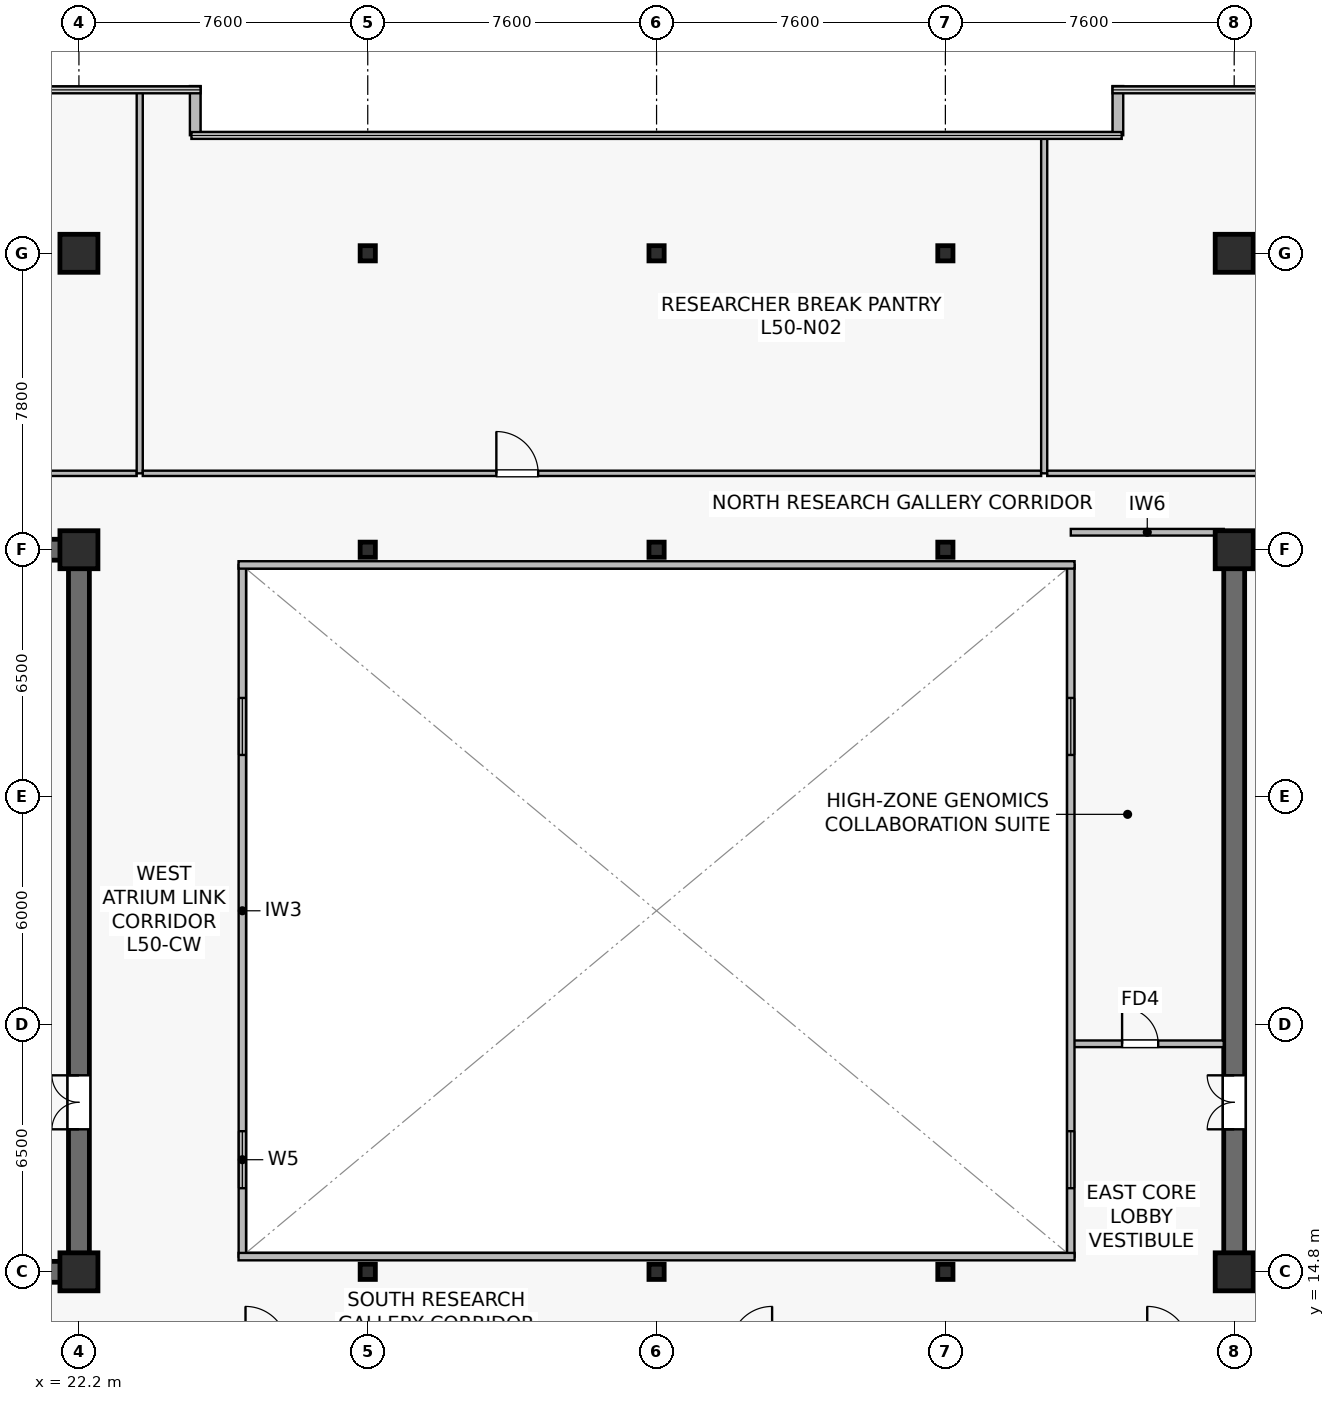
"""IFC4 building model, lengths in metres.
Left out: names, types, materials, properties, quantities, classifications, styles, units other than length and angle.
Written with IfcOpenShell. Run it as: python <this file> out.ifc"""

import sys

from ifc_helpers import new_model, si_unit, direction, frame, frame_2d, origin, origin_2d, place, context, subcontext, project, spatial, rectangle, hollow_rectangle, extrude, source, transform, mapped, element, fill, save


model = new_model("IFC4")
c1 = context("Model", 3, precision=1e-05, world=origin(), true_north=direction((0.0, 1.0)))
c2 = subcontext(c1, "Body", "Model", "MODEL_VIEW")
j1 = project(units=[si_unit("LENGTHUNIT", "METRE"), si_unit("PLANEANGLEUNIT", "RADIAN")], contexts=[c1])
p1 = place(None, origin())
s1 = spatial("IfcSite", under=j1, at=p1, CompositionType="ELEMENT")
p2 = place(p1, origin())
s2 = spatial("IfcBuilding", under=s1, at=p2, CompositionType="ELEMENT")
p3 = place(p2, frame((0.0, 0.0, 209.6)))
s3 = spatial("IfcBuildingStorey", under=s2, at=p3, CompositionType="ELEMENT", Elevation=209.6)
p4 = place(p3, frame((7.125, 14.8, 0.0), z_axis=(0.0, 0.0, 1.0), x_axis=(1.0, 0.0, 0.0)))
e1 = element("IfcWall", 1, at=p4, inside=s3, PredefinedType="SHEAR", context=c2, shape_type="SweptSolid", body=[
    extrude(rectangle(XDim=15.35, YDim=0.55, at=frame_2d((7.675, 0.0))), origin(), (0.0, 0.0, 1.0), 3.8),
])
p5 = place(p3, frame((7.125, 33.8, 0.0), z_axis=(0.0, 0.0, 1.0), x_axis=(1.0, 0.0, 0.0)))
e2 = element("IfcWall", 2, at=p5, inside=s3, PredefinedType="SHEAR", context=c2, shape_type="SweptSolid", body=[
    extrude(rectangle(XDim=15.35, YDim=0.55, at=frame_2d((7.675, 0.0))), origin(), (0.0, 0.0, 1.0), 3.8),
])
p6 = place(p5, frame((5.2, 0.0, 0.0)))
e3 = element("IfcOpeningElement", 3, at=p6, cuts=e2, PredefinedType="OPENING", context=c2, shape_type="SweptSolid", body=[
    extrude(rectangle(XDim=0.95, YDim=2.15, at=frame_2d((0.475, 1.075))), frame((0.0, 0.285, 0.0), z_axis=(0.0, -1.0, 0.0), x_axis=(1.0, 0.0, 0.0)), (0.0, 0.0, 1.0), 0.57),
])
p7 = place(p5, frame((7.715, 0.0, 0.0)))
e4 = element("IfcOpeningElement", 4, at=p7, cuts=e2, PredefinedType="OPENING", context=c2, shape_type="SweptSolid", body=[
    extrude(rectangle(XDim=0.95, YDim=2.15, at=frame_2d((0.475, 1.075))), frame((0.0, 0.285, 0.0), z_axis=(0.0, -1.0, 0.0), x_axis=(1.0, 0.0, 0.0)), (0.0, 0.0, 1.0), 0.57),
])
p8 = place(p5, frame((10.265, 0.0, 0.0)))
e5 = element("IfcOpeningElement", 5, at=p8, cuts=e2, PredefinedType="OPENING", context=c2, shape_type="SweptSolid", body=[
    extrude(rectangle(XDim=0.95, YDim=2.15, at=frame_2d((0.475, 1.075))), frame((0.0, 0.285, 0.0), z_axis=(0.0, -1.0, 0.0), x_axis=(1.0, 0.0, 0.0)), (0.0, 0.0, 1.0), 0.57),
])
p9 = place(p5, frame((12.815, 0.0, 0.0)))
e6 = element("IfcOpeningElement", 6, at=p9, cuts=e2, PredefinedType="OPENING", context=c2, shape_type="SweptSolid", body=[
    extrude(rectangle(XDim=0.95, YDim=2.15, at=frame_2d((0.475, 1.075))), frame((0.0, 0.285, 0.0), z_axis=(0.0, -1.0, 0.0), x_axis=(1.0, 0.0, 0.0)), (0.0, 0.0, 1.0), 0.57),
])
p10 = place(p3, frame((22.2, 15.075, 0.0), z_axis=(0.0, 0.0, 1.0), x_axis=(0.0, 1.0, 0.0)))
e7 = element("IfcWall", 7, at=p10, inside=s3, PredefinedType="SHEAR", context=c2, shape_type="SweptSolid", body=[
    extrude(rectangle(XDim=18.45, YDim=0.55, at=frame_2d((9.225, 0.0))), origin(), (0.0, 0.0, 1.0), 3.8),
])
p11 = place(p10, frame((3.475, 0.0, 0.0)))
e8 = element("IfcOpeningElement", 8, at=p11, cuts=e7, PredefinedType="OPENING", context=c2, shape_type="SweptSolid", body=[
    extrude(rectangle(XDim=1.42, YDim=2.2, at=frame_2d((0.71, 1.1))), frame((0.0, 0.285, 0.0), z_axis=(0.0, -1.0, 0.0), x_axis=(1.0, 0.0, 0.0)), (0.0, 0.0, 1.0), 0.57),
])
p12 = place(p3, frame((52.325, 14.8, 0.0), z_axis=(0.0, 0.0, 1.0), x_axis=(1.0, 0.0, 0.0)))
e9 = element("IfcWall", 9, at=p12, inside=s3, PredefinedType="SHEAR", context=c2, shape_type="SweptSolid", body=[
    extrude(rectangle(XDim=15.35, YDim=0.55, at=frame_2d((7.675, 0.0))), origin(), (0.0, 0.0, 1.0), 3.8),
])
p13 = place(p3, frame((52.325, 33.8, 0.0), z_axis=(0.0, 0.0, 1.0), x_axis=(1.0, 0.0, 0.0)))
e10 = element("IfcWall", 10, at=p13, inside=s3, PredefinedType="SHEAR", context=c2, shape_type="SweptSolid", body=[
    extrude(rectangle(XDim=15.35, YDim=0.55, at=frame_2d((7.675, 0.0))), origin(), (0.0, 0.0, 1.0), 3.8),
])
p14 = place(p13, frame((9.2, 0.0, 0.0)))
e11 = element("IfcOpeningElement", 11, at=p14, cuts=e10, PredefinedType="OPENING", context=c2, shape_type="SweptSolid", body=[
    extrude(rectangle(XDim=0.95, YDim=2.15, at=frame_2d((0.475, 1.075))), frame((0.0, 0.285, 0.0), z_axis=(0.0, -1.0, 0.0), x_axis=(1.0, 0.0, 0.0)), (0.0, 0.0, 1.0), 0.57),
])
p15 = place(p13, frame((6.685, 0.0, 0.0)))
e12 = element("IfcOpeningElement", 12, at=p15, cuts=e10, PredefinedType="OPENING", context=c2, shape_type="SweptSolid", body=[
    extrude(rectangle(XDim=0.95, YDim=2.15, at=frame_2d((0.475, 1.075))), frame((0.0, 0.285, 0.0), z_axis=(0.0, -1.0, 0.0), x_axis=(1.0, 0.0, 0.0)), (0.0, 0.0, 1.0), 0.57),
])
p16 = place(p13, frame((4.135, 0.0, 0.0)))
e13 = element("IfcOpeningElement", 13, at=p16, cuts=e10, PredefinedType="OPENING", context=c2, shape_type="SweptSolid", body=[
    extrude(rectangle(XDim=0.95, YDim=2.15, at=frame_2d((0.475, 1.075))), frame((0.0, 0.285, 0.0), z_axis=(0.0, -1.0, 0.0), x_axis=(1.0, 0.0, 0.0)), (0.0, 0.0, 1.0), 0.57),
])
p17 = place(p13, frame((1.585, 0.0, 0.0)))
e14 = element("IfcOpeningElement", 14, at=p17, cuts=e10, PredefinedType="OPENING", context=c2, shape_type="SweptSolid", body=[
    extrude(rectangle(XDim=0.95, YDim=2.15, at=frame_2d((0.475, 1.075))), frame((0.0, 0.285, 0.0), z_axis=(0.0, -1.0, 0.0), x_axis=(1.0, 0.0, 0.0)), (0.0, 0.0, 1.0), 0.57),
])
p18 = place(p3, frame((52.6, 15.075, 0.0), z_axis=(0.0, 0.0, 1.0), x_axis=(0.0, 1.0, 0.0)))
e15 = element("IfcWall", 15, at=p18, inside=s3, PredefinedType="SHEAR", context=c2, shape_type="SweptSolid", body=[
    extrude(rectangle(XDim=18.45, YDim=0.55, at=frame_2d((9.225, 0.0))), origin(), (0.0, 0.0, 1.0), 3.8),
])
p19 = place(p18, frame((3.475, 0.0, 0.0)))
e16 = element("IfcOpeningElement", 16, at=p19, cuts=e15, PredefinedType="OPENING", context=c2, shape_type="SweptSolid", body=[
    extrude(rectangle(XDim=1.42, YDim=2.2, at=frame_2d((0.71, 1.1))), frame((0.0, 0.285, 0.0), z_axis=(0.0, -1.0, 0.0), x_axis=(1.0, 0.0, 0.0)), (0.0, 0.0, 1.0), 0.57),
])
m1 = source(origin(), c2, "Body", "SweptSolid", [
    extrude(rectangle(XDim=1.0, YDim=1.0, at=origin_2d()), origin(), (0.0, 0.0, 1.0), 4.1),
])
for number, where, z_axis, x_axis in (
    (17, (22.2, 14.8, 0.0), (0.0, 0.0, 1.0), (1.0, 0.0, 0.0)),
    (18, (22.2, 33.8, 0.0), (0.0, 0.0, 1.0), (1.0, 0.0, 0.0)),
    (19, (22.2, 41.6, 0.0), (0.0, 0.0, 1.0), (1.0, 0.0, 0.0)),
    (20, (52.6, 14.8, 0.0), (0.0, 0.0, 1.0), (1.0, 0.0, 0.0)),
    (21, (52.6, 33.8, 0.0), (0.0, 0.0, 1.0), (1.0, 0.0, 0.0)),
    (22, (52.6, 41.6, 0.0), (0.0, 0.0, 1.0), (1.0, 0.0, 0.0)),
):
    element("IfcColumn", number, at=place(p3, frame(where, z_axis=z_axis, x_axis=x_axis)), inside=s3, PredefinedType="COLUMN", context=c2, shape_type="MappedRepresentation", body=[
        mapped(m1, transform((0.0, 0.0, 0.0), scale=1.0)),
    ])
m2 = source(origin(), c2, "Body", "SweptSolid", [
    extrude(hollow_rectangle(XDim=0.4, YDim=0.4, WallThickness=0.019, at=origin_2d()), origin(), (0.0, 0.0, 1.0), 4.1),
])
for number, where, z_axis, x_axis in (
    (23, (29.8, 14.8, 0.0), (0.0, 0.0, 1.0), (1.0, 0.0, 0.0)),
    (24, (29.8, 33.8, 0.0), (0.0, 0.0, 1.0), (1.0, 0.0, 0.0)),
    (25, (29.8, 41.6, 0.0), (0.0, 0.0, 1.0), (1.0, 0.0, 0.0)),
    (26, (37.4, 14.8, 0.0), (0.0, 0.0, 1.0), (1.0, 0.0, 0.0)),
    (27, (37.4, 33.8, 0.0), (0.0, 0.0, 1.0), (1.0, 0.0, 0.0)),
    (28, (37.4, 41.6, 0.0), (0.0, 0.0, 1.0), (1.0, 0.0, 0.0)),
    (29, (45.0, 14.8, 0.0), (0.0, 0.0, 1.0), (1.0, 0.0, 0.0)),
    (30, (45.0, 33.8, 0.0), (0.0, 0.0, 1.0), (1.0, 0.0, 0.0)),
    (31, (45.0, 41.6, 0.0), (0.0, 0.0, 1.0), (1.0, 0.0, 0.0)),
):
    element("IfcColumn", number, at=place(p3, frame(where, z_axis=z_axis, x_axis=x_axis)), inside=s3, PredefinedType="COLUMN", context=c2, shape_type="MappedRepresentation", body=[
        mapped(m2, transform((0.0, 0.0, 0.0), scale=1.0)),
    ])
for number, where, z_axis, x_axis in (
    (32, (49.54, 46.0, 0.0), (0.0, 0.0, 1.0), (0.0, -1.0, 0.0)),
    (33, (25.26, 44.707, 0.0), (0.0, 0.0, 1.0), (0.0, 1.0, 0.0)),
):
    element("IfcWall", number, at=place(p3, frame(where, z_axis=z_axis, x_axis=x_axis)), inside=s3, PredefinedType="STANDARD", context=c2, shape_type="SweptSolid", body=[
        extrude(rectangle(XDim=1.293, YDim=0.28, at=frame_2d((0.646, 0.0))), origin(), (0.0, 0.0, 1.0), 3.8),
    ])
p20 = place(p3, frame((48.3, 34.26, 0.0), z_axis=(0.0, 0.0, 1.0), x_axis=(1.0, 0.0, 0.0)))
e34 = element("IfcWall", 34, at=p20, inside=s3, PredefinedType="PARTITIONING", context=c2, shape_type="SweptSolid", body=[
    extrude(rectangle(XDim=4.025, YDim=0.175, at=frame_2d((2.012, 0.0))), origin(), (0.0, 0.0, 1.0), 3.485),
])
p21 = place(p3, frame((48.3, 20.8, 0.0), z_axis=(0.0, 0.0, 1.0), x_axis=(1.0, 0.0, 0.0)))
e35 = element("IfcWall", 35, at=p21, inside=s3, PredefinedType="PARTITIONING", context=c2, shape_type="SweptSolid", body=[
    extrude(rectangle(XDim=4.025, YDim=0.175, at=frame_2d((2.012, 0.0))), origin(), (0.0, 0.0, 1.0), 3.8),
])
p22 = place(p21, frame((1.35, 0.0, 0.0)))
e36 = element("IfcOpeningElement", 36, at=p22, cuts=e35, PredefinedType="OPENING", context=c2, shape_type="SweptSolid", body=[
    extrude(rectangle(XDim=0.95, YDim=2.15, at=frame_2d((0.475, 1.075))), frame((0.0, 0.098, 0.0), z_axis=(0.0, -1.0, 0.0), x_axis=(1.0, 0.0, 0.0)), (0.0, 0.0, 1.0), 0.195),
])
p23 = place(p3, frame((26.5, 15.2, 0.0), z_axis=(0.0, 0.0, 1.0), x_axis=(0.0, 1.0, 0.0)))
e37 = element("IfcWall", 37, at=p23, inside=s3, PredefinedType="SOLIDWALL", context=c2, shape_type="SweptSolid", body=[
    extrude(rectangle(XDim=18.2, YDim=0.195, at=frame_2d((9.1, 0.0))), origin(), (0.0, 0.0, 1.0), 3.8),
])
p24 = place(p23, frame((1.8, 0.0, 0.9)))
e38 = element("IfcOpeningElement", 38, at=p24, cuts=e37, PredefinedType="OPENING", context=c2, shape_type="SweptSolid", body=[
    extrude(rectangle(XDim=1.5, YDim=1.4, at=frame_2d((0.75, 0.7))), frame((0.0, 0.107, 0.0), z_axis=(0.0, -1.0, 0.0), x_axis=(1.0, 0.0, 0.0)), (0.0, 0.0, 1.0), 0.215),
])
p25 = place(p23, frame((13.2, 0.0, 0.9)))
e39 = element("IfcOpeningElement", 39, at=p25, cuts=e37, PredefinedType="OPENING", context=c2, shape_type="SweptSolid", body=[
    extrude(rectangle(XDim=1.5, YDim=1.4, at=frame_2d((0.75, 0.7))), frame((0.0, 0.107, 0.0), z_axis=(0.0, -1.0, 0.0), x_axis=(1.0, 0.0, 0.0)), (0.0, 0.0, 1.0), 0.215),
])
p26 = place(p3, frame((48.3, 15.2, 0.0), z_axis=(0.0, 0.0, 1.0), x_axis=(0.0, 1.0, 0.0)))
e40 = element("IfcWall", 40, at=p26, inside=s3, PredefinedType="SOLIDWALL", context=c2, shape_type="SweptSolid", body=[
    extrude(rectangle(XDim=18.2, YDim=0.195, at=frame_2d((9.1, 0.0))), origin(), (0.0, 0.0, 1.0), 3.8),
])
p27 = place(p26, frame((1.8, 0.0, 0.9)))
e41 = element("IfcOpeningElement", 41, at=p27, cuts=e40, PredefinedType="OPENING", context=c2, shape_type="SweptSolid", body=[
    extrude(rectangle(XDim=1.5, YDim=1.4, at=frame_2d((0.75, 0.7))), frame((0.0, 0.107, 0.0), z_axis=(0.0, -1.0, 0.0), x_axis=(1.0, 0.0, 0.0)), (0.0, 0.0, 1.0), 0.215),
])
p28 = place(p26, frame((13.2, 0.0, 0.9)))
e42 = element("IfcOpeningElement", 42, at=p28, cuts=e40, PredefinedType="OPENING", context=c2, shape_type="SweptSolid", body=[
    extrude(rectangle(XDim=1.5, YDim=1.4, at=frame_2d((0.75, 0.7))), frame((0.0, 0.107, 0.0), z_axis=(0.0, -1.0, 0.0), x_axis=(1.0, 0.0, 0.0)), (0.0, 0.0, 1.0), 0.215),
])
for number, where, z_axis, x_axis in (
    (43, (26.4, 15.2, 0.0), (0.0, 0.0, 1.0), (1.0, 0.0, 0.0)),
    (44, (26.4, 33.4, 0.0), (0.0, 0.0, 1.0), (1.0, 0.0, 0.0)),
):
    element("IfcWall", number, at=place(p3, frame(where, z_axis=z_axis, x_axis=x_axis)), inside=s3, PredefinedType="SOLIDWALL", context=c2, shape_type="SweptSolid", body=[
        extrude(rectangle(XDim=22.0, YDim=0.195, at=frame_2d((11.0, 0.0))), origin(), (0.0, 0.0, 1.0), 3.8),
    ])
p29 = place(p3, frame((7.31, 35.81, 0.0), z_axis=(0.0, 0.0, 1.0), x_axis=(1.0, 0.0, 0.0)))
e45 = element("IfcWall", 45, at=p29, inside=s3, PredefinedType="PARTITIONING", context=c2, shape_type="SweptSolid", body=[
    extrude(rectangle(XDim=16.41, YDim=0.14, at=frame_2d((8.205, 0.0))), origin(), (0.0, 0.0, 1.0), 3.197),
])
p30 = place(p29, frame((8.093, 0.0, 0.0)))
e46 = element("IfcOpeningElement", 46, at=p30, cuts=e45, PredefinedType="OPENING", context=c2, shape_type="SweptSolid", body=[
    extrude(rectangle(XDim=1.1, YDim=2.18, at=frame_2d((0.55, 1.09))), frame((0.0, 0.08, 0.0), z_axis=(0.0, -1.0, 0.0), x_axis=(1.0, 0.0, 0.0)), (0.0, 0.0, 1.0), 0.16),
])
p31 = place(p3, frame((23.8, 35.81, 0.0), z_axis=(0.0, 0.0, 1.0), x_axis=(0.0, 1.0, 0.0)))
e47 = element("IfcWall", 47, at=p31, inside=s3, PredefinedType="PARTITIONING", context=c2, shape_type="SweptSolid", body=[
    extrude(rectangle(XDim=10.08, YDim=0.16, at=frame_2d((5.04, 0.0))), origin(), (0.0, 0.0, 1.0), 3.135),
])
p32 = place(p3, frame((23.88, 35.81, 0.0), z_axis=(0.0, 0.0, 1.0), x_axis=(1.0, 0.0, 0.0)))
e48 = element("IfcWall", 48, at=p32, inside=s3, PredefinedType="PARTITIONING", context=c2, shape_type="SweptSolid", body=[
    extrude(rectangle(XDim=23.64, YDim=0.14, at=frame_2d((11.82, 0.0))), origin(), (0.0, 0.0, 1.0), 3.197),
])
p33 = place(p32, frame((9.304, 0.0, 0.0)))
e49 = element("IfcOpeningElement", 49, at=p33, cuts=e48, PredefinedType="OPENING", context=c2, shape_type="SweptSolid", body=[
    extrude(rectangle(XDim=1.1, YDim=2.18, at=frame_2d((0.55, 1.09))), frame((0.0, 0.08, 0.0), z_axis=(0.0, -1.0, 0.0), x_axis=(1.0, 0.0, 0.0)), (0.0, 0.0, 1.0), 0.16),
])
p34 = place(p3, frame((47.6, 35.81, 0.0), z_axis=(0.0, 0.0, 1.0), x_axis=(0.0, 1.0, 0.0)))
e50 = element("IfcWall", 50, at=p34, inside=s3, PredefinedType="PARTITIONING", context=c2, shape_type="SweptSolid", body=[
    extrude(rectangle(XDim=8.88, YDim=0.16, at=frame_2d((4.44, 0.0))), origin(), (0.0, 0.0, 1.0), 3.135),
])
p35 = place(p3, frame((47.68, 35.81, 0.0), z_axis=(0.0, 0.0, 1.0), x_axis=(1.0, 0.0, 0.0)))
e51 = element("IfcWall", 51, at=p35, inside=s3, PredefinedType="PARTITIONING", context=c2, shape_type="SweptSolid", body=[
    extrude(rectangle(XDim=19.81, YDim=0.14, at=frame_2d((9.905, 0.0))), origin(), (0.0, 0.0, 1.0), 3.197),
])
p36 = place(p35, frame((9.895, 0.0, 0.0)))
e52 = element("IfcOpeningElement", 52, at=p36, cuts=e51, PredefinedType="OPENING", context=c2, shape_type="SweptSolid", body=[
    extrude(rectangle(XDim=1.1, YDim=2.18, at=frame_2d((0.55, 1.09))), frame((0.0, 0.08, 0.0), z_axis=(0.0, -1.0, 0.0), x_axis=(1.0, 0.0, 0.0)), (0.0, 0.0, 1.0), 0.16),
])
m3 = source(origin(), c2, "Body", "SweptSolid", [
    extrude(rectangle(XDim=1.5, YDim=1.4, at=frame_2d((0.75, 0.7))), frame((0.0, 0.03, 0.0), z_axis=(0.0, -1.0, 0.0), x_axis=(1.0, 0.0, 0.0)), (0.0, 0.0, 1.0), 0.06),
])
p37 = place(p24, origin())
e53 = element("IfcWindow", 53, at=p37, inside=s3, PartitioningType="SINGLE_PANEL", PredefinedType="WINDOW", context=c2, shape_type="MappedRepresentation", body=[
    mapped(m3, transform((0.0, 0.0, 0.0), scale=1.0)),
])
fill(e38, e53)
p38 = place(p25, origin())
e54 = element("IfcWindow", 54, at=p38, inside=s3, PartitioningType="SINGLE_PANEL", PredefinedType="WINDOW", context=c2, shape_type="MappedRepresentation", body=[
    mapped(m3, transform((0.0, 0.0, 0.0), scale=1.0)),
])
fill(e39, e54)
p39 = place(p27, origin())
e55 = element("IfcWindow", 55, at=p39, inside=s3, PartitioningType="SINGLE_PANEL", PredefinedType="WINDOW", context=c2, shape_type="MappedRepresentation", body=[
    mapped(m3, transform((0.0, 0.0, 0.0), scale=1.0)),
])
fill(e41, e55)
p40 = place(p28, origin())
e56 = element("IfcWindow", 56, at=p40, inside=s3, PartitioningType="SINGLE_PANEL", PredefinedType="WINDOW", context=c2, shape_type="MappedRepresentation", body=[
    mapped(m3, transform((0.0, 0.0, 0.0), scale=1.0)),
])
fill(e42, e56)
m4 = source(origin(), c2, "Body", "SweptSolid", [
    extrude(rectangle(XDim=1.42, YDim=2.2, at=frame_2d((0.71, 1.1))), frame((0.0, 0.025, 0.0), z_axis=(0.0, -1.0, 0.0), x_axis=(1.0, 0.0, 0.0)), (0.0, 0.0, 1.0), 0.05),
])
p41 = place(p11, origin())
e57 = element("IfcDoor", 57, at=p41, inside=s3, OperationType="DOUBLE_DOOR_SINGLE_SWING", PredefinedType="DOOR", context=c2, shape_type="MappedRepresentation", body=[
    mapped(m4, transform((0.0, 0.0, 0.0), scale=1.0)),
])
fill(e8, e57)
p42 = place(p19, origin())
e58 = element("IfcDoor", 58, at=p42, inside=s3, OperationType="DOUBLE_DOOR_SINGLE_SWING", PredefinedType="DOOR", context=c2, shape_type="MappedRepresentation", body=[
    mapped(m4, transform((0.0, 0.0, 0.0), scale=1.0)),
])
fill(e16, e58)
m5 = source(origin(), c2, "Body", "SweptSolid", [
    extrude(rectangle(XDim=0.95, YDim=2.15, at=frame_2d((0.475, 1.075))), frame((0.0, 0.025, 0.0), z_axis=(0.0, -1.0, 0.0), x_axis=(1.0, 0.0, 0.0)), (0.0, 0.0, 1.0), 0.05),
])
p43 = place(p22, origin())
e59 = element("IfcDoor", 59, at=p43, inside=s3, OperationType="SINGLE_SWING_LEFT", PredefinedType="DOOR", context=c2, shape_type="MappedRepresentation", body=[
    mapped(m5, transform((0.0, 0.0, 0.0), scale=1.0)),
])
fill(e36, e59)
m6 = source(origin(), c2, "Body", "SweptSolid", [
    extrude(rectangle(XDim=1.1, YDim=2.18, at=frame_2d((0.55, 1.09))), frame((0.0, 0.025, 0.0), z_axis=(0.0, -1.0, 0.0), x_axis=(1.0, 0.0, 0.0)), (0.0, 0.0, 1.0), 0.05),
])
p44 = place(p33, origin())
e60 = element("IfcDoor", 60, at=p44, inside=s3, OperationType="SINGLE_SWING_LEFT", PredefinedType="DOOR", context=c2, shape_type="MappedRepresentation", body=[
    mapped(m6, transform((0.0, 0.0, 0.0), scale=1.0)),
])
fill(e49, e60)
save(model, sys.argv[1])
